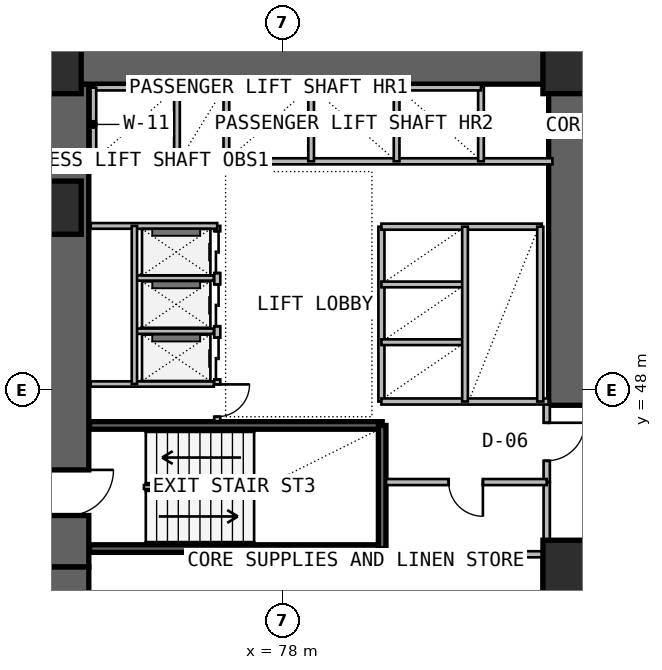
"""IFC4 building model, lengths in metres.
Left out: names, types, materials, properties, quantities, classifications, styles, units other than length and angle.
Written with IfcOpenShell. Run it as: python <this file> out.ifc"""

import sys

from ifc_helpers import new_model, si_unit, direction, frame, frame_2d, origin, origin_2d, place, context, subcontext, project, spatial, rectangle, extrude, element, fill, save


model = new_model("IFC4")
c1 = context("Model", 3, precision=1e-05, world=origin(), true_north=direction((0.0, 1.0)))
c2 = subcontext(c1, "Body", "Model", "MODEL_VIEW")
j1 = project(units=[si_unit("LENGTHUNIT", "METRE"), si_unit("PLANEANGLEUNIT", "RADIAN")], contexts=[c1])
p1 = place(None, origin())
s1 = spatial("IfcSite", under=j1, at=p1, CompositionType="ELEMENT")
p2 = place(p1, origin())
s2 = spatial("IfcBuilding", under=s1, at=p2, CompositionType="ELEMENT")
p3 = place(p2, frame((0.0, 0.0, 26.7)))
s3 = spatial("IfcBuildingStorey", under=s2, at=p3, CompositionType="ELEMENT", Elevation=26.7)
p4 = place(p3, frame((72.35, 35.5, -0.4), z_axis=(0.0, 0.0, 1.0), x_axis=(0.0, 1.0, 0.0)))
e1 = element("IfcWall", 1, at=p4, inside=s3, PredefinedType="SHEAR", context=c2, shape_type="SweptSolid", body=[
    extrude(rectangle(XDim=7.85, YDim=1.1, at=frame_2d((3.925, 0.0))), origin(), (0.0, 0.0, 1.0), 3.8),
])
p5 = place(p4, frame((1.45, 0.0, 0.4)))
e2 = element("IfcOpeningElement", 2, at=p5, cuts=e1, PredefinedType="OPENING", context=c2, shape_type="SweptSolid", body=[
    extrude(rectangle(XDim=1.2, YDim=2.2, at=frame_2d((0.6, 1.1))), frame((0.0, 0.56, 0.0), z_axis=(0.0, -1.0, 0.0), x_axis=(1.0, 0.0, 0.0)), (0.0, 0.0, 1.0), 1.12),
])
p6 = place(p3, frame((72.35, 43.35, -0.4), z_axis=(0.0, 0.0, 1.0), x_axis=(0.0, 1.0, 0.0)))
e3 = element("IfcWall", 3, at=p6, inside=s3, PredefinedType="SHEAR", context=c2, shape_type="SweptSolid", body=[
    extrude(rectangle(XDim=12.7, YDim=1.1, at=frame_2d((6.35, 0.0))), origin(), (0.0, 0.0, 1.0), 3.8),
])
p7 = place(p6, frame((1.35, 0.0, 0.4)))
e4 = element("IfcOpeningElement", 4, at=p7, cuts=e3, PredefinedType="OPENING", context=c2, shape_type="SweptSolid", body=[
    extrude(rectangle(XDim=1.2, YDim=2.2, at=frame_2d((0.6, 1.1))), frame((0.0, 0.56, 0.0), z_axis=(0.0, -1.0, 0.0), x_axis=(1.0, 0.0, 0.0)), (0.0, 0.0, 1.0), 1.12),
])
p8 = place(p3, frame((71.8, 56.6, -0.4), z_axis=(0.0, 0.0, 1.0), x_axis=(1.0, 0.0, 0.0)))
e5 = element("IfcWall", 5, at=p8, inside=s3, PredefinedType="SHEAR", context=c2, shape_type="SweptSolid", body=[
    extrude(rectangle(XDim=14.3, YDim=1.1, at=frame_2d((7.15, 0.0))), origin(), (0.0, 0.0, 1.0), 3.8),
])
p9 = place(p3, frame((85.55, 47.6, -0.4), z_axis=(0.0, 0.0, 1.0), x_axis=(0.0, 1.0, 0.0)))
e6 = element("IfcWall", 6, at=p9, inside=s3, PredefinedType="SHEAR", context=c2, shape_type="SweptSolid", body=[
    extrude(rectangle(XDim=8.45, YDim=1.1, at=frame_2d((4.225, 0.0))), origin(), (0.0, 0.0, 1.0), 3.8),
])
for number, where, z_axis, x_axis in (
    (7, (85.55, 43.35, 0.0), (0.0, 0.0, 1.0), (1.0, 0.0, 0.0)),
    (8, (72.0, 52.8, 0.0), (0.0, 0.0, 1.0), (1.0, 0.0, 0.0)),
    (9, (72.0, 56.5, 0.0), (0.0, 0.0, 1.0), (1.0, 0.0, 0.0)),
    (10, (85.55, 56.5, 0.0), (0.0, 0.0, 1.0), (1.0, 0.0, 0.0)),
):
    element("IfcColumn", number, at=place(p3, frame(where, z_axis=z_axis, x_axis=x_axis)), inside=s3, PredefinedType="COLUMN", context=c2, shape_type="SweptSolid", body=[
        extrude(rectangle(XDim=1.4, YDim=1.4, at=origin_2d()), origin(), (0.0, 0.0, 1.0), 3.6),
    ])
p10 = place(p3, frame((84.92, 38.85, 0.0), z_axis=(0.0, 0.0, 1.0), x_axis=(0.0, 1.0, 0.0)))
e11 = element("IfcWall", 11, at=p10, inside=s3, PredefinedType="SOLIDWALL", context=c2, shape_type="SweptSolid", body=[
    extrude(rectangle(XDim=4.83, YDim=0.2, at=frame_2d((2.415, 0.0))), origin(), (0.0, 0.0, 1.0), 3.4),
])
p11 = place(p10, frame((1.25, 0.0, 0.0)))
e12 = element("IfcOpeningElement", 12, at=p11, cuts=e11, PredefinedType="OPENING", context=c2, shape_type="SweptSolid", body=[
    extrude(rectangle(XDim=1.1, YDim=2.2, at=frame_2d((0.55, 1.1))), frame((0.0, 0.11, 0.0), z_axis=(0.0, -1.0, 0.0), x_axis=(1.0, 0.0, 0.0)), (0.0, 0.0, 1.0), 0.22),
])
for number, where, z_axis, x_axis in (
    (13, (72.92, 43.83, -0.4), (0.0, 0.0, 1.0), (1.0, 0.0, 0.0)),
    (14, (72.92, 47.07, -0.4), (0.0, 0.0, 1.0), (1.0, 0.0, 0.0)),
):
    element("IfcWall", number, at=place(p3, frame(where, z_axis=z_axis, x_axis=x_axis)), inside=s3, PredefinedType="SOLIDWALL", context=c2, shape_type="SweptSolid", body=[
        extrude(rectangle(XDim=7.7, YDim=0.2, at=frame_2d((3.85, 0.0))), origin(), (0.0, 0.0, 1.0), 3.8),
    ])
p12 = place(p3, frame((80.62, 43.83, -0.4), z_axis=(0.0, 0.0, 1.0), x_axis=(0.0, 1.0, 0.0)))
e15 = element("IfcWall", 15, at=p12, inside=s3, PredefinedType="SOLIDWALL", context=c2, shape_type="SweptSolid", body=[
    extrude(rectangle(XDim=3.24, YDim=0.2, at=frame_2d((1.62, 0.0))), origin(), (0.0, 0.0, 1.0), 3.8),
])
p13 = place(p3, frame((84.95, 43.68, 0.0), z_axis=(0.0, 0.0, 1.0), x_axis=(0.0, 1.0, 0.0)))
e16 = element("IfcWall", 16, at=p13, inside=s3, PredefinedType="PLUMBINGWALL", context=c2, shape_type="SweptSolid", body=[
    extrude(rectangle(XDim=1.9, YDim=0.165, at=frame_2d((0.95, 0.0))), origin(), (0.0, 0.0, 1.0), 3.4),
])
p14 = place(p3, frame((84.95, 45.58, 0.0), z_axis=(0.0, 0.0, 1.0), x_axis=(0.0, 1.0, 0.0)))
e17 = element("IfcWall", 17, at=p14, inside=s3, PredefinedType="PARTITIONING", context=c2, shape_type="SweptSolid", body=[
    extrude(rectangle(XDim=2.12, YDim=0.165, at=frame_2d((1.06, 0.0))), origin(), (0.0, 0.0, 1.0), 3.4),
])
p15 = place(p14, frame((0.56, 0.0, 0.0)))
e18 = element("IfcOpeningElement", 18, at=p15, cuts=e17, PredefinedType="OPENING", context=c2, shape_type="SweptSolid", body=[
    extrude(rectangle(XDim=1.0, YDim=2.2, at=frame_2d((0.5, 1.1))), frame((0.0, 0.093, 0.0), z_axis=(0.0, -1.0, 0.0), x_axis=(1.0, 0.0, 0.0)), (0.0, 0.0, 1.0), 0.185),
])
p16 = place(p3, frame((80.72, 45.58, 0.0), z_axis=(0.0, 0.0, 1.0), x_axis=(1.0, 0.0, 0.0)))
e19 = element("IfcWall", 19, at=p16, inside=s3, PredefinedType="PLUMBINGWALL", context=c2, shape_type="SweptSolid", body=[
    extrude(rectangle(XDim=4.23, YDim=0.16, at=frame_2d((2.115, 0.0))), origin(), (0.0, 0.0, 1.0), 3.4),
])
p17 = place(p16, frame((1.65, 0.0, 0.0)))
e20 = element("IfcOpeningElement", 20, at=p17, cuts=e19, PredefinedType="OPENING", context=c2, shape_type="SweptSolid", body=[
    extrude(rectangle(XDim=0.9, YDim=2.1, at=frame_2d((0.45, 1.05))), frame((0.0, 0.09, 0.0), z_axis=(0.0, -1.0, 0.0), x_axis=(1.0, 0.0, 0.0)), (0.0, 0.0, 1.0), 0.18),
])
p18 = place(p3, frame((80.76, 43.68, 0.0), z_axis=(0.0, 0.0, 1.0), x_axis=(1.0, 0.0, 0.0)))
e21 = element("IfcWall", 21, at=p18, inside=s3, PredefinedType="PLUMBINGWALL", context=c2, shape_type="SweptSolid", body=[
    extrude(rectangle(XDim=4.19, YDim=0.16, at=frame_2d((2.095, 0.0))), origin(), (0.0, 0.0, 1.0), 3.4),
])
p19 = place(p3, frame((76.28, 47.18, 0.0), z_axis=(0.0, 0.0, 1.0), x_axis=(0.0, 1.0, 0.0)))
e22 = element("IfcWall", 22, at=p19, inside=s3, PredefinedType="SOLIDWALL", context=c2, shape_type="SweptSolid", body=[
    extrude(rectangle(XDim=5.14, YDim=0.16, at=frame_2d((2.57, 0.0))), origin(), (0.0, 0.0, 1.0), 3.4),
])
p20 = place(p19, frame((1.1, 0.0, 0.0)))
e23 = element("IfcOpeningElement", 23, at=p20, cuts=e22, PredefinedType="OPENING", context=c2, shape_type="SweptSolid", body=[
    extrude(rectangle(XDim=1.1, YDim=2.25, at=frame_2d((0.55, 1.125))), frame((0.0, 0.09, 0.0), z_axis=(0.0, -1.0, 0.0), x_axis=(1.0, 0.0, 0.0)), (0.0, 0.0, 1.0), 0.18),
])
p21 = place(p19, frame((2.5, 0.0, 0.0)))
e24 = element("IfcOpeningElement", 24, at=p21, cuts=e22, PredefinedType="OPENING", context=c2, shape_type="SweptSolid", body=[
    extrude(rectangle(XDim=1.1, YDim=2.25, at=frame_2d((0.55, 1.125))), frame((0.0, 0.09, 0.0), z_axis=(0.0, -1.0, 0.0), x_axis=(1.0, 0.0, 0.0)), (0.0, 0.0, 1.0), 0.18),
])
p22 = place(p19, frame((3.9, 0.0, 0.0)))
e25 = element("IfcOpeningElement", 25, at=p22, cuts=e22, PredefinedType="OPENING", context=c2, shape_type="SweptSolid", body=[
    extrude(rectangle(XDim=1.1, YDim=2.25, at=frame_2d((0.55, 1.125))), frame((0.0, 0.09, 0.0), z_axis=(0.0, -1.0, 0.0), x_axis=(1.0, 0.0, 0.0)), (0.0, 0.0, 1.0), 0.18),
])
p23 = place(p19, frame((0.12, 0.0, 0.0)))
e26 = element("IfcOpeningElement", 26, at=p23, cuts=e22, PredefinedType="OPENING", context=c2, shape_type="SweptSolid", body=[
    extrude(rectangle(XDim=0.85, YDim=2.05, at=frame_2d((0.425, 1.025))), frame((0.0, 0.09, 0.0), z_axis=(0.0, -1.0, 0.0), x_axis=(1.0, 0.0, 0.0)), (0.0, 0.0, 1.0), 0.18),
])
p24 = place(p3, frame((72.95, 52.32, 0.0), z_axis=(0.0, 0.0, 1.0), x_axis=(1.0, 0.0, 0.0)))
e27 = element("IfcWall", 27, at=p24, inside=s3, PredefinedType="SOLIDWALL", context=c2, shape_type="SweptSolid", body=[
    extrude(rectangle(XDim=3.33, YDim=0.15, at=frame_2d((1.665, 0.0))), origin(), (0.0, 0.0, 1.0), 3.4),
])
p25 = place(p3, frame((72.95, 48.16, 0.0), z_axis=(0.0, 0.0, 1.0), x_axis=(1.0, 0.0, 0.0)))
e28 = element("IfcWall", 28, at=p25, inside=s3, PredefinedType="PLUMBINGWALL", context=c2, shape_type="SweptSolid", body=[
    extrude(rectangle(XDim=3.24, YDim=0.14, at=frame_2d((1.62, 0.0))), origin(), (0.0, 0.0, 1.0), 3.4),
])
for number, where, z_axis, x_axis in (
    (29, (74.15, 49.55, 0.0), (0.0, 0.0, 1.0), (1.0, 0.0, 0.0)),
    (30, (74.15, 50.95, 0.0), (0.0, 0.0, 1.0), (1.0, 0.0, 0.0)),
):
    element("IfcWall", number, at=place(p3, frame(where, z_axis=z_axis, x_axis=x_axis)), inside=s3, PredefinedType="PLUMBINGWALL", context=c2, shape_type="SweptSolid", body=[
        extrude(rectangle(XDim=2.04, YDim=0.14, at=frame_2d((1.02, 0.0))), origin(), (0.0, 0.0, 1.0), 3.4),
    ])
p26 = place(p3, frame((74.1, 48.16, 0.0), z_axis=(0.0, 0.0, 1.0), x_axis=(0.0, 1.0, 0.0)))
e31 = element("IfcWall", 31, at=p26, inside=s3, PredefinedType="PLUMBINGWALL", context=c2, shape_type="SweptSolid", body=[
    extrude(rectangle(XDim=4.16, YDim=0.14, at=frame_2d((2.08, 0.0))), origin(), (0.0, 0.0, 1.0), 3.4),
])
p27 = place(p3, frame((80.6, 47.7, 0.0), z_axis=(0.0, 0.0, 1.0), x_axis=(0.0, 1.0, 0.0)))
e32 = element("IfcWall", 32, at=p27, inside=s3, PredefinedType="SOLIDWALL", context=c2, shape_type="SweptSolid", body=[
    extrude(rectangle(XDim=4.6, YDim=0.16, at=frame_2d((2.3, 0.0))), origin(), (0.0, 0.0, 1.0), 3.4),
])
p28 = place(p3, frame((80.6, 47.7, 0.0), z_axis=(0.0, 0.0, 1.0), x_axis=(1.0, 0.0, 0.0)))
e33 = element("IfcWall", 33, at=p28, inside=s3, PredefinedType="SOLIDWALL", context=c2, shape_type="SweptSolid", body=[
    extrude(rectangle(XDim=4.4, YDim=0.16, at=frame_2d((2.2, 0.0))), origin(), (0.0, 0.0, 1.0), 3.4),
])
p29 = place(p3, frame((80.6, 52.3, 0.0), z_axis=(0.0, 0.0, 1.0), x_axis=(1.0, 0.0, 0.0)))
e34 = element("IfcWall", 34, at=p29, inside=s3, PredefinedType="SOLIDWALL", context=c2, shape_type="SweptSolid", body=[
    extrude(rectangle(XDim=4.22, YDim=0.16, at=frame_2d((2.11, 0.0))), origin(), (0.0, 0.0, 1.0), 3.4),
])
for number, where, z_axis, x_axis in (
    (35, (80.6, 49.26, 0.0), (0.0, 0.0, 1.0), (1.0, 0.0, 0.0)),
    (36, (80.6, 50.78, 0.0), (0.0, 0.0, 1.0), (1.0, 0.0, 0.0)),
):
    element("IfcWall", number, at=place(p3, frame(where, z_axis=z_axis, x_axis=x_axis)), inside=s3, PredefinedType="PLUMBINGWALL", context=c2, shape_type="SweptSolid", body=[
        extrude(rectangle(XDim=2.2, YDim=0.15, at=frame_2d((1.1, 0.0))), origin(), (0.0, 0.0, 1.0), 3.4),
    ])
p30 = place(p3, frame((82.8, 47.7, 0.0), z_axis=(0.0, 0.0, 1.0), x_axis=(0.0, 1.0, 0.0)))
e37 = element("IfcWall", 37, at=p30, inside=s3, PredefinedType="PLUMBINGWALL", context=c2, shape_type="SweptSolid", body=[
    extrude(rectangle(XDim=4.6, YDim=0.15, at=frame_2d((2.3, 0.0))), origin(), (0.0, 0.0, 1.0), 3.4),
])
p31 = place(p3, frame((84.78, 47.7, 0.0), z_axis=(0.0, 0.0, 1.0), x_axis=(0.0, 1.0, 0.0)))
e38 = element("IfcWall", 38, at=p31, inside=s3, PredefinedType="SOLIDWALL", context=c2, shape_type="SweptSolid", body=[
    extrude(rectangle(XDim=4.6, YDim=0.16, at=frame_2d((2.3, 0.0))), origin(), (0.0, 0.0, 1.0), 3.4),
])
p32 = place(p3, frame((73.02, 54.02, 0.0), z_axis=(0.0, 0.0, 1.0), x_axis=(1.0, 0.0, 0.0)))
e39 = element("IfcWall", 39, at=p32, inside=s3, PredefinedType="SOLIDWALL", context=c2, shape_type="SweptSolid", body=[
    extrude(rectangle(XDim=12.08, YDim=0.16, at=frame_2d((6.04, 0.0))), origin(), (0.0, 0.0, 1.0), 3.4),
])
p33 = place(p3, frame((73.02, 55.96, 0.0), z_axis=(0.0, 0.0, 1.0), x_axis=(1.0, 0.0, 0.0)))
e40 = element("IfcWall", 40, at=p33, inside=s3, PredefinedType="SOLIDWALL", context=c2, shape_type="SweptSolid", body=[
    extrude(rectangle(XDim=3.5, YDim=0.15, at=frame_2d((1.75, 0.0))), origin(), (0.0, 0.0, 1.0), 3.4),
])
p34 = place(p3, frame((73.02, 54.02, 0.0), z_axis=(0.0, 0.0, 1.0), x_axis=(0.0, 1.0, 0.0)))
e41 = element("IfcWall", 41, at=p34, inside=s3, PredefinedType="PLUMBINGWALL", context=c2, shape_type="SweptSolid", body=[
    extrude(rectangle(XDim=1.94, YDim=0.15, at=frame_2d((0.97, 0.0))), origin(), (0.0, 0.0, 1.0), 3.4),
])
p35 = place(p3, frame((76.52, 54.02, 0.0), z_axis=(0.0, 0.0, 1.0), x_axis=(0.0, 1.0, 0.0)))
e42 = element("IfcWall", 42, at=p35, inside=s3, PredefinedType="SOLIDWALL", context=c2, shape_type="SweptSolid", body=[
    extrude(rectangle(XDim=1.94, YDim=0.15, at=frame_2d((0.97, 0.0))), origin(), (0.0, 0.0, 1.0), 3.4),
])
p36 = place(p3, frame((75.22, 54.02, 0.0), z_axis=(0.0, 0.0, 1.0), x_axis=(0.0, 1.0, 0.0)))
e43 = element("IfcWall", 43, at=p36, inside=s3, PredefinedType="PLUMBINGWALL", context=c2, shape_type="SweptSolid", body=[
    extrude(rectangle(XDim=1.94, YDim=0.15, at=frame_2d((0.97, 0.0))), origin(), (0.0, 0.0, 1.0), 3.4),
])
for number, where, z_axis, x_axis in (
    (44, (78.75, 54.02, 0.0), (0.0, 0.0, 1.0), (0.0, 1.0, 0.0)),
    (45, (81.0, 54.02, 0.0), (0.0, 0.0, 1.0), (0.0, 1.0, 0.0)),
):
    element("IfcWall", number, at=place(p3, frame(where, z_axis=z_axis, x_axis=x_axis)), inside=s3, PredefinedType="PLUMBINGWALL", context=c2, shape_type="SweptSolid", body=[
        extrude(rectangle(XDim=1.96, YDim=0.15, at=frame_2d((0.98, 0.0))), origin(), (0.0, 0.0, 1.0), 3.4),
    ])
p37 = place(p3, frame((83.22, 54.02, 0.0), z_axis=(0.0, 0.0, 1.0), x_axis=(0.0, 1.0, 0.0)))
e46 = element("IfcWall", 46, at=p37, inside=s3, PredefinedType="SOLIDWALL", context=c2, shape_type="SweptSolid", body=[
    extrude(rectangle(XDim=1.96, YDim=0.15, at=frame_2d((0.98, 0.0))), origin(), (0.0, 0.0, 1.0), 3.4),
])
p38 = place(p3, frame((76.52, 55.96, 0.0), z_axis=(0.0, 0.0, 1.0), x_axis=(1.0, 0.0, 0.0)))
e47 = element("IfcWall", 47, at=p38, inside=s3, PredefinedType="SOLIDWALL", context=c2, shape_type="SweptSolid", body=[
    extrude(rectangle(XDim=6.7, YDim=0.15, at=frame_2d((3.35, 0.0))), origin(), (0.0, 0.0, 1.0), 3.4),
])
p39 = place(p7, frame((1.2, 0.0, 0.0), z_axis=(0.0, 0.0, 1.0), x_axis=(-1.0, 0.0, 0.0)))
e48 = element("IfcDoor", 48, at=p39, inside=s3, OperationType="SINGLE_SWING_LEFT", PredefinedType="USERDEFINED", context=c2, shape_type="SweptSolid", body=[
    extrude(rectangle(XDim=1.2, YDim=2.2, at=frame_2d((0.6, 1.1))), frame((0.0, 0.025, 0.0), z_axis=(0.0, -1.0, 0.0), x_axis=(1.0, 0.0, 0.0)), (0.0, 0.0, 1.0), 0.05),
])
fill(e4, e48)
p40 = place(p15, frame((1.0, 0.0, 0.0), z_axis=(0.0, 0.0, 1.0), x_axis=(-1.0, 0.0, 0.0)))
e49 = element("IfcDoor", 49, at=p40, inside=s3, OperationType="SINGLE_SWING_LEFT", PredefinedType="DOOR", context=c2, shape_type="SweptSolid", body=[
    extrude(rectangle(XDim=1.0, YDim=2.2, at=frame_2d((0.5, 1.1))), frame((0.0, 0.025, 0.0), z_axis=(0.0, -1.0, 0.0), x_axis=(1.0, 0.0, 0.0)), (0.0, 0.0, 1.0), 0.05),
])
fill(e18, e49)
p41 = place(p17, frame((0.9, 0.0, 0.0), z_axis=(0.0, 0.0, 1.0), x_axis=(-1.0, 0.0, 0.0)))
e50 = element("IfcDoor", 50, at=p41, inside=s3, OperationType="SINGLE_SWING_LEFT", PredefinedType="DOOR", context=c2, shape_type="SweptSolid", body=[
    extrude(rectangle(XDim=0.9, YDim=2.1, at=frame_2d((0.45, 1.05))), frame((0.0, 0.025, 0.0), z_axis=(0.0, -1.0, 0.0), x_axis=(1.0, 0.0, 0.0)), (0.0, 0.0, 1.0), 0.05),
])
fill(e20, e50)
p42 = place(p20, origin())
e51 = element("IfcDoor", 51, at=p42, inside=s3, OperationType="DOUBLE_DOOR_SLIDING", PredefinedType="DOOR", context=c2, shape_type="SweptSolid", body=[
    extrude(rectangle(XDim=1.1, YDim=2.25, at=frame_2d((0.55, 1.125))), frame((0.0, 0.025, 0.0), z_axis=(0.0, -1.0, 0.0), x_axis=(1.0, 0.0, 0.0)), (0.0, 0.0, 1.0), 0.05),
])
fill(e23, e51)
p43 = place(p21, origin())
e52 = element("IfcDoor", 52, at=p43, inside=s3, OperationType="DOUBLE_DOOR_SLIDING", PredefinedType="DOOR", context=c2, shape_type="SweptSolid", body=[
    extrude(rectangle(XDim=1.1, YDim=2.25, at=frame_2d((0.55, 1.125))), frame((0.0, 0.025, 0.0), z_axis=(0.0, -1.0, 0.0), x_axis=(1.0, 0.0, 0.0)), (0.0, 0.0, 1.0), 0.05),
])
fill(e24, e52)
p44 = place(p22, origin())
e53 = element("IfcDoor", 53, at=p44, inside=s3, OperationType="DOUBLE_DOOR_SLIDING", PredefinedType="DOOR", context=c2, shape_type="SweptSolid", body=[
    extrude(rectangle(XDim=1.1, YDim=2.25, at=frame_2d((0.55, 1.125))), frame((0.0, 0.025, 0.0), z_axis=(0.0, -1.0, 0.0), x_axis=(1.0, 0.0, 0.0)), (0.0, 0.0, 1.0), 0.05),
])
fill(e25, e53)
p45 = place(p23, frame((0.85, 0.0, 0.0), z_axis=(0.0, 0.0, 1.0), x_axis=(-1.0, 0.0, 0.0)))
e54 = element("IfcDoor", 54, at=p45, inside=s3, OperationType="SINGLE_SWING_LEFT", PredefinedType="DOOR", context=c2, shape_type="SweptSolid", body=[
    extrude(rectangle(XDim=0.85, YDim=2.05, at=frame_2d((0.425, 1.025))), frame((0.0, 0.025, 0.0), z_axis=(0.0, -1.0, 0.0), x_axis=(1.0, 0.0, 0.0)), (0.0, 0.0, 1.0), 0.05),
])
fill(e26, e54)
save(model, sys.argv[1])
